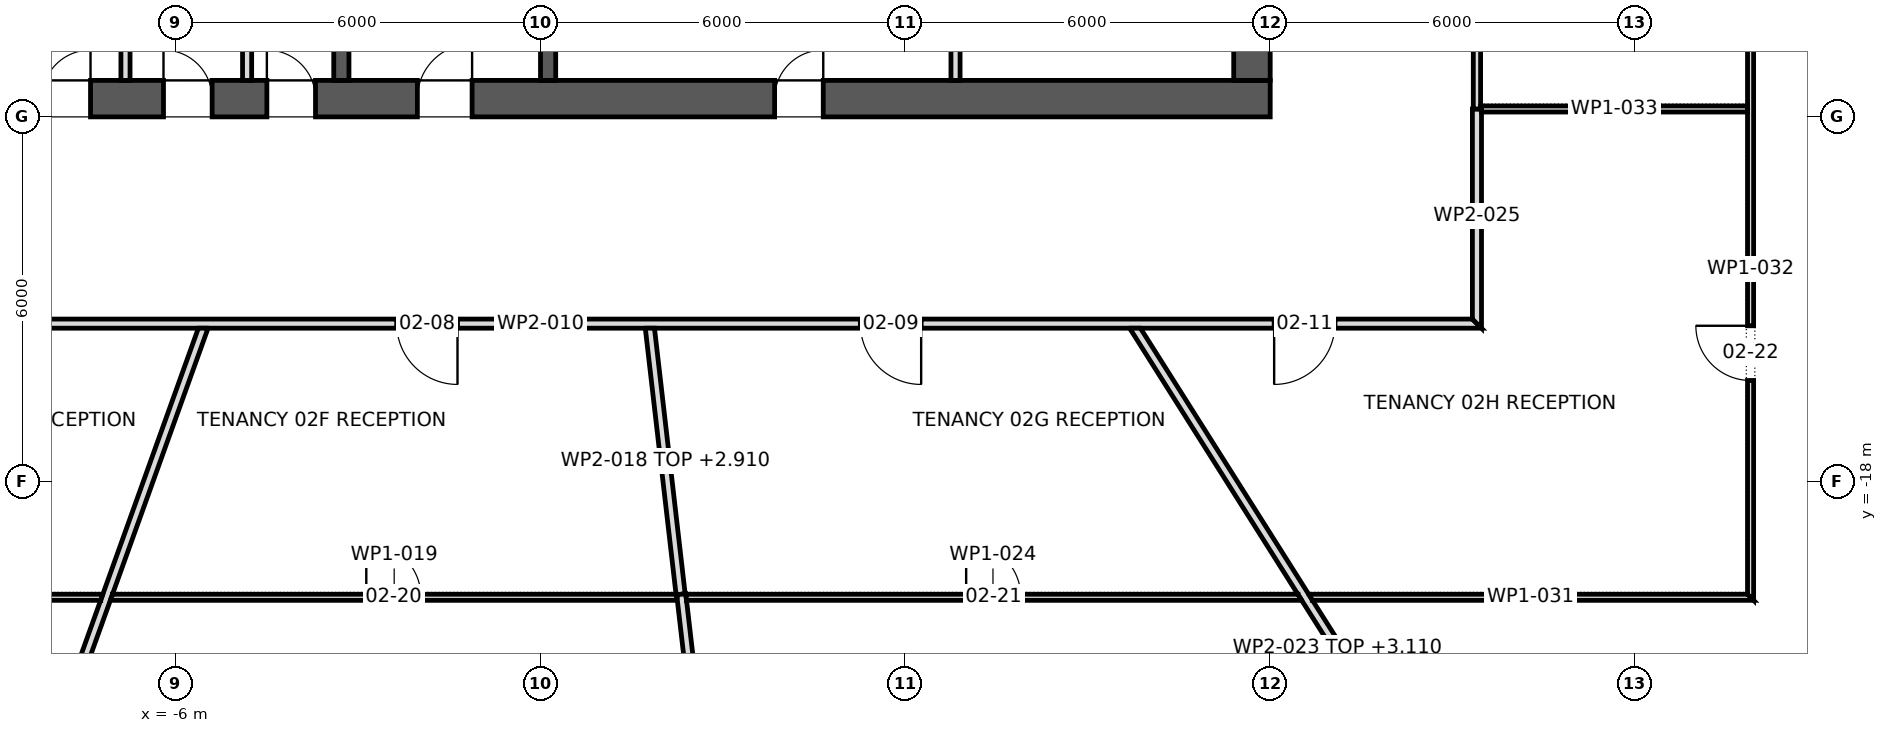
"""IFC4 building model, lengths in metres.
Left out: names, types, materials, properties, quantities, classifications, styles, units other than length and angle.
Written with IfcOpenShell. Run it as: python <this file> out.ifc"""

import sys

from ifc_helpers import new_model, si_unit, direction, frame, frame_2d, origin, place, context, subcontext, project, spatial, polyline, rectangle, outline, extrude, element, fill, save


model = new_model("IFC4")
c1 = context("Model", 3, precision=1e-05, world=origin(), true_north=direction((0.0, 1.0)))
c2 = subcontext(c1, "Body", "Model", "MODEL_VIEW")
j1 = project(units=[si_unit("LENGTHUNIT", "METRE"), si_unit("PLANEANGLEUNIT", "RADIAN")], contexts=[c1])
p1 = place(None, origin())
s1 = spatial("IfcSite", under=j1, at=p1, CompositionType="ELEMENT")
p2 = place(p1, origin())
s2 = spatial("IfcBuilding", under=s1, at=p2, CompositionType="ELEMENT")
p3 = place(p2, frame((0.0, 0.0, 44.5)))
s3 = spatial("IfcBuildingStorey", under=s2, at=p3, CompositionType="ELEMENT", Elevation=44.5)
p4 = place(p3, frame((-12.0, -11.7, 0.0), z_axis=(0.0, 0.0, 1.0), x_axis=(1.0, 0.0, 0.0)))
e1 = element("IfcWall", 1, at=p4, inside=s3, PredefinedType="SHEAR", context=c2, shape_type="SweptSolid", body=[
    extrude(rectangle(XDim=24.0, YDim=0.6, at=frame_2d((12.0, 0.0))), origin(), (0.0, 0.0, 1.0), 4.2),
])
p5 = place(p4, frame((9.975, 0.0, 0.0)))
e2 = element("IfcOpeningElement", 2, at=p5, cuts=e1, PredefinedType="OPENING", context=c2, shape_type="SweptSolid", body=[
    extrude(rectangle(XDim=0.9, YDim=2.1, at=frame_2d((0.45, 1.05))), frame((0.0, 0.312, 0.0), z_axis=(0.0, -1.0, 0.0), x_axis=(1.0, 0.0, 0.0)), (0.0, 0.0, 1.0), 0.624),
])
p6 = place(p4, frame((3.8, 0.0, 0.0)))
e3 = element("IfcOpeningElement", 3, at=p6, cuts=e1, PredefinedType="OPENING", context=c2, shape_type="SweptSolid", body=[
    extrude(rectangle(XDim=0.8, YDim=2.1, at=frame_2d((0.4, 1.05))), frame((0.0, 0.312, 0.0), z_axis=(0.0, -1.0, 0.0), x_axis=(1.0, 0.0, 0.0)), (0.0, 0.0, 1.0), 0.624),
])
p7 = place(p4, frame((5.8, 0.0, 0.0)))
e4 = element("IfcOpeningElement", 4, at=p7, cuts=e1, PredefinedType="OPENING", context=c2, shape_type="SweptSolid", body=[
    extrude(rectangle(XDim=0.8, YDim=2.1, at=frame_2d((0.4, 1.05))), frame((0.0, 0.312, 0.0), z_axis=(0.0, -1.0, 0.0), x_axis=(1.0, 0.0, 0.0)), (0.0, 0.0, 1.0), 0.624),
])
p8 = place(p4, frame((7.5, 0.0, 0.0)))
e5 = element("IfcOpeningElement", 5, at=p8, cuts=e1, PredefinedType="OPENING", context=c2, shape_type="SweptSolid", body=[
    extrude(rectangle(XDim=0.8, YDim=2.1, at=frame_2d((0.4, 1.05))), frame((0.0, 0.312, 0.0), z_axis=(0.0, -1.0, 0.0), x_axis=(1.0, 0.0, 0.0)), (0.0, 0.0, 1.0), 0.624),
])
p9 = place(p4, frame((15.85, 0.0, 0.0)))
e6 = element("IfcOpeningElement", 6, at=p9, cuts=e1, PredefinedType="OPENING", context=c2, shape_type="SweptSolid", body=[
    extrude(rectangle(XDim=0.8, YDim=2.1, at=frame_2d((0.4, 1.05))), frame((0.0, 0.312, 0.0), z_axis=(0.0, -1.0, 0.0), x_axis=(1.0, 0.0, 0.0)), (0.0, 0.0, 1.0), 0.624),
])
p10 = place(p3, frame((11.7, -11.4, 0.0), z_axis=(0.0, 0.0, 1.0), x_axis=(0.0, 1.0, 0.0)))
e7 = element("IfcWall", 7, at=p10, inside=s3, PredefinedType="SHEAR", context=c2, shape_type="SweptSolid", body=[
    extrude(rectangle(XDim=22.8, YDim=0.6, at=frame_2d((11.4, 0.0))), origin(), (0.0, 0.0, 1.0), 4.2),
])
p11 = place(p10, frame((10.2, 0.0, 0.0)))
e8 = element("IfcOpeningElement", 8, at=p11, cuts=e7, PredefinedType="OPENING", context=c2, shape_type="SweptSolid", body=[
    extrude(rectangle(XDim=2.4, YDim=2.1, at=frame_2d((1.2, 1.05))), frame((0.0, 0.312, 0.0), z_axis=(0.0, -1.0, 0.0), x_axis=(1.0, 0.0, 0.0)), (0.0, 0.0, 1.0), 0.624),
])
p12 = place(p10, frame((19.5, 0.0, 0.0)))
e9 = element("IfcOpeningElement", 9, at=p12, cuts=e7, PredefinedType="OPENING", context=c2, shape_type="SweptSolid", body=[
    extrude(rectangle(XDim=1.2, YDim=2.1, at=frame_2d((0.6, 1.05))), frame((0.0, 0.312, 0.0), z_axis=(0.0, -1.0, 0.0), x_axis=(1.0, 0.0, 0.0)), (0.0, 0.0, 1.0), 0.624),
])
p13 = place(p10, frame((2.1, 0.0, 0.0)))
e10 = element("IfcOpeningElement", 10, at=p13, cuts=e7, PredefinedType="OPENING", context=c2, shape_type="SweptSolid", body=[
    extrude(rectangle(XDim=1.2, YDim=2.1, at=frame_2d((0.6, 1.05))), frame((0.0, 0.312, 0.0), z_axis=(0.0, -1.0, 0.0), x_axis=(1.0, 0.0, 0.0)), (0.0, 0.0, 1.0), 0.624),
])
for number, where, z_axis, x_axis in (
    (11, (-3.275, -11.4, 0.0), (0.0, 0.0, 1.0), (0.0, 1.0, 0.0)),
    (12, (0.125, -11.4, 0.0), (0.0, 0.0, 1.0), (0.0, 1.0, 0.0)),
):
    element("IfcWall", number, at=place(p3, frame(where, z_axis=z_axis, x_axis=x_axis)), inside=s3, PredefinedType="SHEAR", context=c2, shape_type="SweptSolid", body=[
        extrude(rectangle(XDim=4.9, YDim=0.25, at=frame_2d((2.45, 0.0))), origin(), (0.0, 0.0, 1.0), 3.9),
    ])
for number, where, z_axis, x_axis in (
    (13, (-6.825, -11.4, 0.0), (0.0, 0.0, 1.0), (0.0, 1.0, 0.0)),
    (14, (-4.825, -11.4, 0.0), (0.0, 0.0, 1.0), (0.0, 1.0, 0.0)),
    (15, (6.825, -11.4, 0.0), (0.0, 0.0, 1.0), (0.0, 1.0, 0.0)),
):
    element("IfcWall", number, at=place(p3, frame(where, z_axis=z_axis, x_axis=x_axis)), inside=s3, PredefinedType="PARTITIONING", context=c2, shape_type="SweptSolid", body=[
        extrude(rectangle(XDim=1.5, YDim=0.15, at=frame_2d((0.75, 0.0))), origin(), (0.0, 0.0, 1.0), 3.9),
    ])
p14 = place(p3, frame((-15.475, -15.4, 0.0), z_axis=(0.0, 0.0, 1.0), x_axis=(1.0, 0.0, 0.0)))
e16 = element("IfcWall", 16, at=p14, inside=s3, PredefinedType="PARTITIONING", context=c2, shape_type="SweptSolid", body=[
    extrude(outline(polyline([(0.0, -0.075), (1.935, -0.075), (3.869, -0.075), (5.803, -0.075), (7.738, -0.075), (9.672, -0.075), (11.606, -0.075), (13.541, -0.075), (15.475, -0.075), (17.409, -0.075), (19.344, -0.075), (21.278, -0.075), (23.212, -0.075), (25.147, -0.075), (27.081, -0.075), (29.016, -0.075), (30.95, -0.075), (30.8, 0.075), (28.885, 0.075), (26.969, 0.075), (25.053, 0.075), (23.138, 0.075), (21.222, 0.075), (19.306, 0.075), (17.391, 0.075), (15.475, 0.075), (13.56, 0.075), (11.644, 0.075), (9.728, 0.075), (7.812, 0.075), (5.897, 0.075), (3.981, 0.075), (2.066, 0.075), (0.15, 0.075), (0.0, -0.075)])), origin(), (0.0, 0.0, 1.0), 3.9),
])
p15 = place(p14, frame((4.745, 0.0, 0.0)))
e17 = element("IfcOpeningElement", 17, at=p15, cuts=e16, PredefinedType="OPENING", context=c2, shape_type="SweptSolid", body=[
    extrude(rectangle(XDim=1.0, YDim=2.1, at=frame_2d((0.5, 1.05))), frame((0.0, 0.087, 0.0), z_axis=(0.0, -1.0, 0.0), x_axis=(1.0, 0.0, 0.0)), (0.0, 0.0, 1.0), 0.174),
])
p16 = place(p14, frame((13.11, 0.0, 0.0)))
e18 = element("IfcOpeningElement", 18, at=p16, cuts=e16, PredefinedType="OPENING", context=c2, shape_type="SweptSolid", body=[
    extrude(rectangle(XDim=1.0, YDim=2.1, at=frame_2d((0.5, 1.05))), frame((0.0, 0.087, 0.0), z_axis=(0.0, -1.0, 0.0), x_axis=(1.0, 0.0, 0.0)), (0.0, 0.0, 1.0), 0.174),
])
p17 = place(p14, frame((20.735, 0.0, 0.0)))
e19 = element("IfcOpeningElement", 19, at=p17, cuts=e16, PredefinedType="OPENING", context=c2, shape_type="SweptSolid", body=[
    extrude(rectangle(XDim=1.0, YDim=2.1, at=frame_2d((0.5, 1.05))), frame((0.0, 0.087, 0.0), z_axis=(0.0, -1.0, 0.0), x_axis=(1.0, 0.0, 0.0)), (0.0, 0.0, 1.0), 0.174),
])
p18 = place(p14, frame((27.54, 0.0, 0.0)))
e20 = element("IfcOpeningElement", 20, at=p18, cuts=e16, PredefinedType="OPENING", context=c2, shape_type="SweptSolid", body=[
    extrude(rectangle(XDim=1.0, YDim=2.1, at=frame_2d((0.5, 1.05))), frame((0.0, 0.087, 0.0), z_axis=(0.0, -1.0, 0.0), x_axis=(1.0, 0.0, 0.0)), (0.0, 0.0, 1.0), 0.174),
])
p19 = place(p3, frame((-10.119, -28.209, 0.0), z_axis=(0.0, 0.0, 1.0), x_axis=(0.337949016046, 0.941164418448, 0.0)))
e21 = element("IfcWall", 21, at=p19, inside=s3, PredefinedType="PARTITIONING", context=c2, shape_type="SweptSolid", body=[
    extrude(outline(polyline([(0.014, -0.075), (1.792, -0.075), (3.57, -0.075), (5.347, -0.075), (7.125, -0.075), (8.903, -0.075), (8.908, -0.073), (8.909, -0.075), (10.458, -0.075), (12.008, -0.075), (13.557, -0.075), (13.557, -0.074), (13.555, -0.069), (13.555, -0.069), (13.503, 0.075), (11.919, 0.075), (10.335, 0.075), (8.751, 0.075), (8.749, 0.074), (8.749, 0.075), (6.999, 0.075), (5.249, 0.075), (3.5, 0.075), (1.75, 0.075), (0.0, 0.075), (0.0, 0.071), (0.0, -0.0), (0.014, -0.075)])), origin(), (0.0, 0.0, 1.0), 2.91),
])
p20 = place(p3, frame((-7.198, -19.9, 0.0), z_axis=(0.0, 0.0, 1.0), x_axis=(-1.0, 0.0, 0.0)))
e22 = element("IfcWall", 22, at=p20, inside=s3, PredefinedType="PARTITIONING", context=c2, shape_type="SweptSolid", body=[
    extrude(outline(polyline([(0.0, -0.05), (1.993, -0.05), (3.986, -0.05), (5.979, -0.05), (7.972, -0.05), (9.965, -0.05), (11.958, -0.05), (12.055, 0.05), (12.055, 0.05), (10.338, 0.05), (8.621, 0.05), (6.904, 0.05), (5.187, 0.05), (3.47, 0.05), (1.753, 0.05), (0.035, 0.05), (0.0, -0.049), (0.0, -0.05)])), origin(), (0.0, 0.0, 1.0), 3.9),
])
p21 = place(p20, frame((5.577, 0.0, 0.0)))
e23 = element("IfcOpeningElement", 23, at=p21, cuts=e22, PredefinedType="OPENING", context=c2, shape_type="SweptSolid", body=[
    extrude(rectangle(XDim=0.9, YDim=2.1, at=frame_2d((0.45, 1.05))), frame((0.0, 0.062, 0.0), z_axis=(0.0, -1.0, 0.0), x_axis=(1.0, 0.0, 0.0)), (0.0, 0.0, 1.0), 0.124),
])
p22 = place(p3, frame((1.798, -15.467, 0.0), z_axis=(0.0, 0.0, 1.0), x_axis=(0.114783679138, -0.993390510828, 0.0)))
e24 = element("IfcWall", 24, at=p22, inside=s3, PredefinedType="PARTITIONING", context=c2, shape_type="SweptSolid", body=[
    extrude(outline(polyline([(0.0, -0.075), (1.468, -0.075), (2.936, -0.075), (4.404, -0.075), (4.404, -0.075), (4.407, -0.075), (4.413, -0.075), (4.413, 0.075), (2.948, 0.075), (1.483, 0.075), (0.017, 0.075), (0.0, -0.073), (0.0, -0.075)])), origin(), (0.0, 0.0, 1.0), 2.91),
])
p23 = place(p3, frame((2.25, -19.9, 0.0), z_axis=(0.0, 0.0, 1.0), x_axis=(-1.0, 0.0, 0.0)))
e25 = element("IfcWall", 25, at=p23, inside=s3, PredefinedType="PARTITIONING", context=c2, shape_type="SweptSolid", body=[
    extrude(outline(polyline([(0.021, -0.05), (1.875, -0.05), (3.728, -0.05), (5.581, -0.05), (7.435, -0.05), (9.288, -0.05), (9.324, 0.05), (9.324, 0.05), (7.459, 0.05), (5.594, 0.05), (3.729, 0.05), (1.865, 0.05), (0.0, 0.05), (0.0, 0.047), (0.01, -0.041), (0.0, -0.042), (0.0, -0.043), (0.02, -0.041), (0.021, -0.05)])), origin(), (0.0, 0.0, 1.0), 3.9),
])
p24 = place(p23, frame((4.215, 0.0, 0.0)))
e26 = element("IfcOpeningElement", 26, at=p24, cuts=e25, PredefinedType="OPENING", context=c2, shape_type="SweptSolid", body=[
    extrude(rectangle(XDim=0.9, YDim=2.1, at=frame_2d((0.45, 1.05))), frame((0.0, 0.062, 0.0), z_axis=(0.0, -1.0, 0.0), x_axis=(1.0, 0.0, 0.0)), (0.0, 0.0, 1.0), 0.124),
])
p25 = place(p3, frame((2.314, -19.85, 0.0), z_axis=(0.0, 0.0, 1.0), x_axis=(0.115247328534, -0.9933368277, 0.0)))
e27 = element("IfcWall", 27, at=p25, inside=s3, PredefinedType="PARTITIONING", context=c2, shape_type="SweptSolid", body=[
    extrude(outline(polyline([(0.089, -0.075), (1.979, -0.075), (3.87, -0.075), (5.76, -0.075), (7.65, -0.075), (9.541, -0.075), (9.546, -0.034), (9.546, 0.075), (7.658, 0.075), (5.771, 0.075), (3.884, 0.075), (1.996, 0.075), (0.109, 0.075), (0.109, 0.074), (0.098, 0.075), (0.0, 0.075), (0.0, -0.065), (0.089, -0.075)])), origin(), (0.0, 0.0, 1.0), 2.91),
])
p26 = place(p3, frame((9.752, -15.435, 0.0), z_axis=(0.0, 0.0, 1.0), x_axis=(0.534413972524, -0.845222873549, 0.0)))
e28 = element("IfcWall", 28, at=p26, inside=s3, PredefinedType="PARTITIONING", context=c2, shape_type="SweptSolid", body=[
    extrude(outline(polyline([(0.0, -0.075), (1.725, -0.075), (3.451, -0.075), (5.176, -0.075), (5.177, -0.073), (5.181, -0.075), (7.005, -0.075), (8.83, -0.075), (10.655, -0.075), (12.48, -0.075), (12.497, 0.001), (12.5, 0.064), (12.5, 0.075), (10.723, 0.075), (8.945, 0.075), (7.167, 0.075), (5.389, 0.075), (5.387, 0.072), (5.383, 0.075), (3.62, 0.075), (1.858, 0.075), (0.095, 0.075), (0.0, -0.075), (0.0, -0.075)])), origin(), (0.0, 0.0, 1.0), 3.11),
])
p27 = place(p3, frame((12.518, -19.9, 0.0), z_axis=(0.0, 0.0, 1.0), x_axis=(-1.0, 0.0, 0.0)))
e29 = element("IfcWall", 29, at=p27, inside=s3, PredefinedType="PARTITIONING", context=c2, shape_type="SweptSolid", body=[
    extrude(outline(polyline([(10.128, -0.05), (10.128, -0.048), (10.117, 0.05), (8.431, 0.05), (6.745, 0.05), (5.058, 0.05), (3.372, 0.05), (1.686, 0.05), (0.0, 0.05), (0.0, 0.05), (0.063, -0.05), (1.741, -0.05), (3.418, -0.05), (5.096, -0.05), (6.773, -0.05), (8.451, -0.05), (10.128, -0.05)])), origin(), (0.0, 0.0, 1.0), 3.9),
])
p28 = place(p27, frame((4.618, 0.0, 0.0)))
e30 = element("IfcOpeningElement", 30, at=p28, cuts=e29, PredefinedType="OPENING", context=c2, shape_type="SweptSolid", body=[
    extrude(rectangle(XDim=0.9, YDim=2.1, at=frame_2d((0.45, 1.05))), frame((0.0, 0.062, 0.0), z_axis=(0.0, -1.0, 0.0), x_axis=(1.0, 0.0, 0.0)), (0.0, 0.0, 1.0), 0.124),
])
p29 = place(p3, frame((15.4, -11.87, 0.0), z_axis=(0.0, 0.0, 1.0), x_axis=(0.0, -1.0, 0.0)))
e31 = element("IfcWall", 31, at=p29, inside=s3, PredefinedType="PARTITIONING", context=c2, shape_type="SweptSolid", body=[
    extrude(outline(polyline([(0.0, -0.075), (1.728, -0.075), (3.455, -0.075), (3.605, 0.075), (1.802, 0.075), (0.0, 0.075), (0.0, -0.075)])), origin(), (0.0, 0.0, 1.0), 3.9),
])
p30 = place(p3, frame((15.4, -6.96, 0.0), z_axis=(0.0, 0.0, 1.0), x_axis=(0.0, -1.0, 0.0)))
e32 = element("IfcWall", 32, at=p30, inside=s3, PredefinedType="PARTITIONING", context=c2, shape_type="SweptSolid", body=[
    extrude(rectangle(XDim=4.91, YDim=0.12, at=frame_2d((2.455, 0.0))), origin(), (0.0, 0.0, 1.0), 3.9),
])
p31 = place(p30, frame((1.955, 0.0, 0.0)))
e33 = element("IfcOpeningElement", 33, at=p31, cuts=e32, PredefinedType="OPENING", context=c2, shape_type="SweptSolid", body=[
    extrude(rectangle(XDim=1.0, YDim=2.1, at=frame_2d((0.5, 1.05))), frame((0.0, 0.072, 0.0), z_axis=(0.0, -1.0, 0.0), x_axis=(1.0, 0.0, 0.0)), (0.0, 0.0, 1.0), 0.144),
])
p32 = place(p3, frame((19.95, -19.9, 0.0), z_axis=(0.0, 0.0, 1.0), x_axis=(-1.0, 0.0, 0.0)))
e34 = element("IfcWall", 34, at=p32, inside=s3, PredefinedType="PARTITIONING", context=c2, shape_type="SweptSolid", body=[
    extrude(outline(polyline([(7.317, -0.05), (7.317, -0.05), (7.254, 0.05), (5.441, 0.05), (3.627, 0.05), (1.813, 0.05), (0.0, 0.05), (0.1, -0.05), (0.1, -0.05), (1.904, -0.05), (3.709, -0.05), (5.513, -0.05), (7.317, -0.05)])), origin(), (0.0, 0.0, 1.0), 3.9),
])
p33 = place(p3, frame((19.9, -19.95, 0.0), z_axis=(0.0, 0.0, 1.0), x_axis=(0.0, 1.0, 0.0)))
e35 = element("IfcWall", 35, at=p33, inside=s3, PredefinedType="PARTITIONING", context=c2, shape_type="SweptSolid", body=[
    extrude(outline(polyline([(10.846, 0.05), (9.055, 0.05), (7.264, 0.05), (5.473, 0.05), (3.682, 0.05), (1.891, 0.05), (0.1, 0.05), (0.0, -0.05), (1.808, -0.05), (3.615, -0.05), (5.423, -0.05), (7.231, -0.05), (9.039, -0.05), (10.846, -0.05), (10.846, 0.05)])), origin(), (0.0, 0.0, 1.0), 3.9),
])
p34 = place(p33, frame((3.615, 0.0, 0.0)))
e36 = element("IfcOpeningElement", 36, at=p34, cuts=e35, PredefinedType="OPENING", context=c2, shape_type="SweptSolid", body=[
    extrude(rectangle(XDim=0.9, YDim=2.1, at=frame_2d((0.45, 1.05))), frame((0.0, 0.062, 0.0), z_axis=(0.0, -1.0, 0.0), x_axis=(1.0, 0.0, 0.0)), (0.0, 0.0, 1.0), 0.124),
])
p35 = place(p3, frame((19.85, -11.87, 0.0), z_axis=(0.0, 0.0, 1.0), x_axis=(-1.0, 0.0, 0.0)))
e37 = element("IfcWall", 37, at=p35, inside=s3, PredefinedType="PARTITIONING", context=c2, shape_type="SweptSolid", body=[
    extrude(outline(polyline([(4.39, -0.05), (4.39, 0.0), (4.375, 0.0), (4.375, 0.05), (2.917, 0.05), (1.458, 0.05), (0.0, 0.05), (0.0, -0.05), (1.463, -0.05), (2.927, -0.05), (4.39, -0.05)])), origin(), (0.0, 0.0, 1.0), 3.9),
])
p36 = place(p3, frame((19.937, -9.017, 0.0), z_axis=(0.0, 0.0, 1.0), x_axis=(0.911435859514, -0.411442187909, 0.0)))
e38 = element("IfcWall", 38, at=p36, inside=s3, PredefinedType="PARTITIONING", context=c2, shape_type="SweptSolid", body=[
    extrude(outline(polyline([(0.0, -0.075), (0.045, -0.075), (0.048, -0.074), (0.049, -0.075), (2.013, -0.075), (3.978, -0.075), (5.943, -0.075), (7.908, -0.075), (9.873, -0.075), (11.838, -0.075), (11.856, -0.001), (11.858, 0.069), (11.858, 0.075), (9.882, 0.075), (7.906, 0.075), (5.929, 0.075), (3.953, 0.075), (1.976, 0.075), (0.0, 0.075), (0.0, -0.075)])), origin(), (0.0, 0.0, 1.0), 2.91),
])
p37 = place(p5, origin())
e39 = element("IfcDoor", 39, at=p37, inside=s3, OperationType="SINGLE_SWING_LEFT", PredefinedType="DOOR", context=c2, shape_type="SweptSolid", body=[
    extrude(rectangle(XDim=0.9, YDim=2.1, at=frame_2d((0.45, 1.05))), frame((0.0, 0.025, 0.0), z_axis=(0.0, -1.0, 0.0), x_axis=(1.0, 0.0, 0.0)), (0.0, 0.0, 1.0), 0.05),
])
fill(e2, e39)
p38 = place(p6, origin())
e40 = element("IfcDoor", 40, at=p38, inside=s3, OperationType="SINGLE_SWING_LEFT", PredefinedType="DOOR", context=c2, shape_type="SweptSolid", body=[
    extrude(rectangle(XDim=0.8, YDim=2.1, at=frame_2d((0.4, 1.05))), frame((0.0, 0.025, 0.0), z_axis=(0.0, -1.0, 0.0), x_axis=(1.0, 0.0, 0.0)), (0.0, 0.0, 1.0), 0.05),
])
fill(e3, e40)
p39 = place(p7, origin())
e41 = element("IfcDoor", 41, at=p39, inside=s3, OperationType="SINGLE_SWING_RIGHT", PredefinedType="DOOR", context=c2, shape_type="SweptSolid", body=[
    extrude(rectangle(XDim=0.8, YDim=2.1, at=frame_2d((0.4, 1.05))), frame((0.0, 0.025, 0.0), z_axis=(0.0, -1.0, 0.0), x_axis=(1.0, 0.0, 0.0)), (0.0, 0.0, 1.0), 0.05),
])
fill(e4, e41)
p40 = place(p8, origin())
e42 = element("IfcDoor", 42, at=p40, inside=s3, OperationType="SINGLE_SWING_RIGHT", PredefinedType="DOOR", context=c2, shape_type="SweptSolid", body=[
    extrude(rectangle(XDim=0.8, YDim=2.1, at=frame_2d((0.4, 1.05))), frame((0.0, 0.025, 0.0), z_axis=(0.0, -1.0, 0.0), x_axis=(1.0, 0.0, 0.0)), (0.0, 0.0, 1.0), 0.05),
])
fill(e5, e42)
p41 = place(p9, origin())
e43 = element("IfcDoor", 43, at=p41, inside=s3, OperationType="SINGLE_SWING_LEFT", PredefinedType="DOOR", context=c2, shape_type="SweptSolid", body=[
    extrude(rectangle(XDim=0.8, YDim=2.1, at=frame_2d((0.4, 1.05))), frame((0.0, 0.025, 0.0), z_axis=(0.0, -1.0, 0.0), x_axis=(1.0, 0.0, 0.0)), (0.0, 0.0, 1.0), 0.05),
])
fill(e6, e43)
p42 = place(p16, frame((1.0, 0.0, 0.0), z_axis=(0.0, 0.0, 1.0), x_axis=(-1.0, 0.0, 0.0)))
e44 = element("IfcDoor", 44, at=p42, inside=s3, OperationType="SINGLE_SWING_RIGHT", PredefinedType="DOOR", context=c2, shape_type="SweptSolid", body=[
    extrude(rectangle(XDim=1.0, YDim=2.1, at=frame_2d((0.5, 1.05))), frame((0.0, 0.025, 0.0), z_axis=(0.0, -1.0, 0.0), x_axis=(1.0, 0.0, 0.0)), (0.0, 0.0, 1.0), 0.05),
])
fill(e18, e44)
p43 = place(p17, frame((1.0, 0.0, 0.0), z_axis=(0.0, 0.0, 1.0), x_axis=(-1.0, 0.0, 0.0)))
e45 = element("IfcDoor", 45, at=p43, inside=s3, OperationType="SINGLE_SWING_RIGHT", PredefinedType="DOOR", context=c2, shape_type="SweptSolid", body=[
    extrude(rectangle(XDim=1.0, YDim=2.1, at=frame_2d((0.5, 1.05))), frame((0.0, 0.025, 0.0), z_axis=(0.0, -1.0, 0.0), x_axis=(1.0, 0.0, 0.0)), (0.0, 0.0, 1.0), 0.05),
])
fill(e19, e45)
p44 = place(p18, frame((1.0, 0.0, 0.0), z_axis=(0.0, 0.0, 1.0), x_axis=(-1.0, 0.0, 0.0)))
e46 = element("IfcDoor", 46, at=p44, inside=s3, OperationType="SINGLE_SWING_LEFT", PredefinedType="DOOR", context=c2, shape_type="SweptSolid", body=[
    extrude(rectangle(XDim=1.0, YDim=2.1, at=frame_2d((0.5, 1.05))), frame((0.0, 0.025, 0.0), z_axis=(0.0, -1.0, 0.0), x_axis=(1.0, 0.0, 0.0)), (0.0, 0.0, 1.0), 0.05),
])
fill(e20, e46)
p45 = place(p24, frame((0.9, 0.0, 0.0), z_axis=(0.0, 0.0, 1.0), x_axis=(-1.0, 0.0, 0.0)))
e47 = element("IfcDoor", 47, at=p45, inside=s3, OperationType="SINGLE_SWING_RIGHT", PredefinedType="DOOR", context=c2, shape_type="SweptSolid", body=[
    extrude(rectangle(XDim=0.9, YDim=2.1, at=frame_2d((0.45, 1.05))), frame((0.0, 0.025, 0.0), z_axis=(0.0, -1.0, 0.0), x_axis=(1.0, 0.0, 0.0)), (0.0, 0.0, 1.0), 0.05),
])
fill(e26, e47)
p46 = place(p28, frame((0.9, 0.0, 0.0), z_axis=(0.0, 0.0, 1.0), x_axis=(-1.0, 0.0, 0.0)))
e48 = element("IfcDoor", 48, at=p46, inside=s3, OperationType="SINGLE_SWING_RIGHT", PredefinedType="DOOR", context=c2, shape_type="SweptSolid", body=[
    extrude(rectangle(XDim=0.9, YDim=2.1, at=frame_2d((0.45, 1.05))), frame((0.0, 0.025, 0.0), z_axis=(0.0, -1.0, 0.0), x_axis=(1.0, 0.0, 0.0)), (0.0, 0.0, 1.0), 0.05),
])
fill(e30, e48)
p47 = place(p34, origin())
e49 = element("IfcDoor", 49, at=p47, inside=s3, OperationType="SINGLE_SWING_LEFT", PredefinedType="DOOR", context=c2, shape_type="SweptSolid", body=[
    extrude(rectangle(XDim=0.9, YDim=2.1, at=frame_2d((0.45, 1.05))), frame((0.0, 0.025, 0.0), z_axis=(0.0, -1.0, 0.0), x_axis=(1.0, 0.0, 0.0)), (0.0, 0.0, 1.0), 0.05),
])
fill(e36, e49)
save(model, sys.argv[1])
